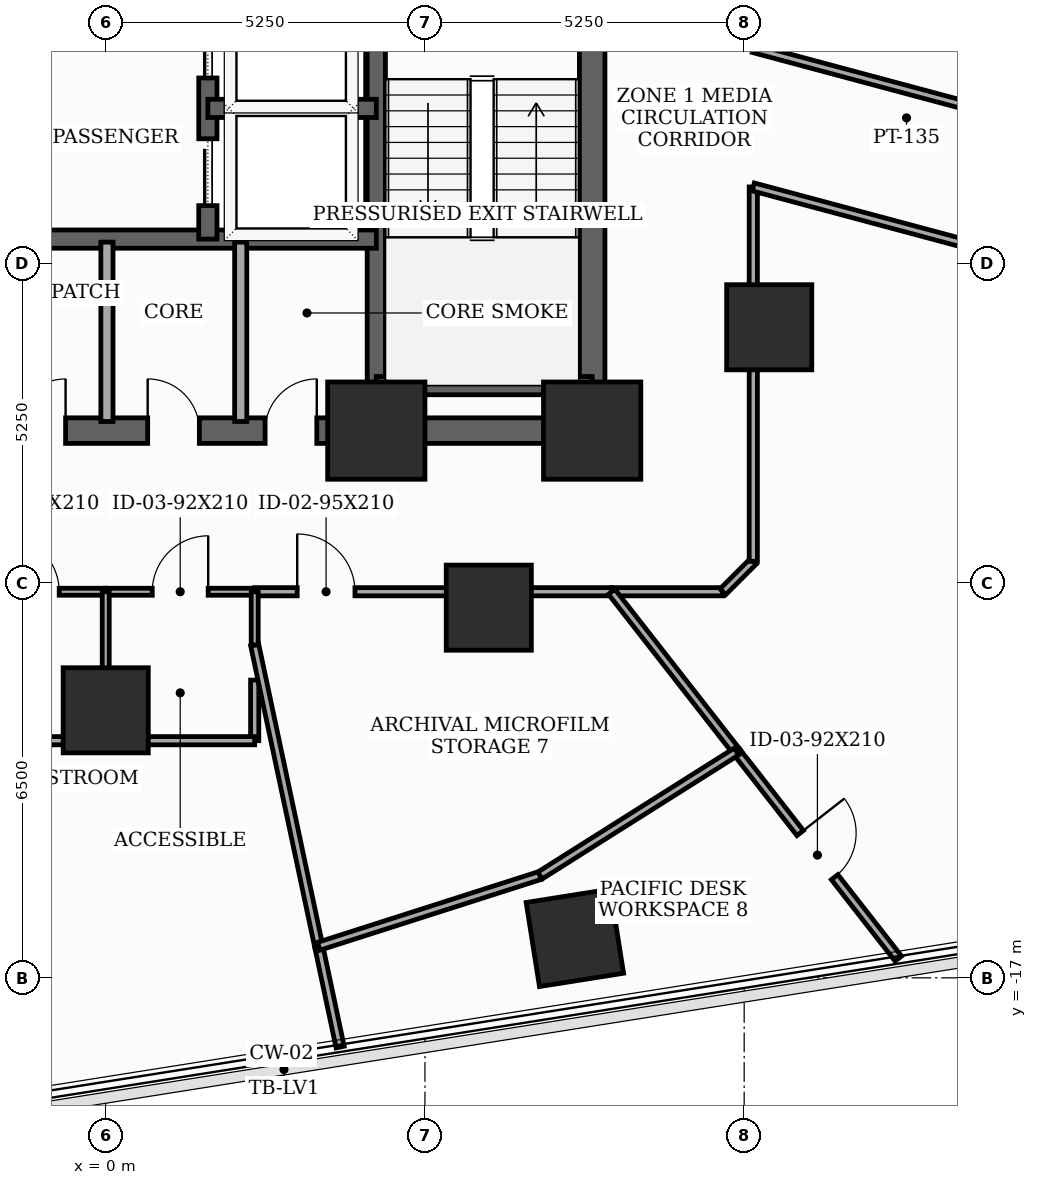
"""IFC4 building model, lengths in metres.
Left out: names, types, materials, properties, quantities, classifications, styles, units other than length and angle.
Written with IfcOpenShell. Run it as: python <this file> out.ifc"""

import sys

from ifc_helpers import new_model, si_unit, direction, frame, frame_2d, origin, origin_2d, place, context, subcontext, project, spatial, rectangle, extrude, element, fill, save


model = new_model("IFC4")
c1 = context("Model", 3, precision=1e-05, world=origin(), true_north=direction((0.0, 1.0)))
c2 = subcontext(c1, "Body", "Model", "MODEL_VIEW")
j1 = project(units=[si_unit("LENGTHUNIT", "METRE"), si_unit("PLANEANGLEUNIT", "RADIAN")], contexts=[c1])
p1 = place(None, origin())
s1 = spatial("IfcSite", under=j1, at=p1, CompositionType="ELEMENT")
p2 = place(p1, origin())
s2 = spatial("IfcBuilding", under=s1, at=p2, CompositionType="ELEMENT")
p3 = place(p2, frame((0.0, 0.0, 77.8)))
s3 = spatial("IfcBuildingStorey", under=s2, at=p3, CompositionType="ELEMENT", Elevation=77.8)
for number, where, z_axis, x_axis in (
    (1, (4.45, -8.0, 0.0), (0.0, 0.0, 1.0), (1.0, 0.0, 0.0)),
    (2, (8.0, -8.0, 0.0), (0.0, 0.0, 1.0), (1.0, 0.0, 0.0)),
):
    element("IfcColumn", number, at=place(p3, frame(where, z_axis=z_axis, x_axis=x_axis)), inside=s3, PredefinedType="COLUMN", context=c2, shape_type="SweptSolid", body=[
        extrude(rectangle(XDim=1.6, YDim=1.6, at=origin_2d()), origin(), (0.0, 0.0, 1.0), 3.7),
    ])
for number, where, z_axis, x_axis in (
    (3, (0.0, -12.6, 0.0), (0.0, 0.0, 1.0), (1.0, 0.0, 0.0)),
    (4, (6.3, -10.912, 0.0), (0.0, 0.0, 1.0), (1.0, 0.0, 0.0)),
    (5, (10.912, -6.3, 0.0), (0.0, 0.0, 1.0), (1.0, 0.0, 0.0)),
    (6, (7.716, -16.343, 0.0), (0.0, 0.0, 1.0), (0.988, 0.156, 0.0)),
):
    element("IfcColumn", number, at=place(p3, frame(where, z_axis=z_axis, x_axis=x_axis)), inside=s3, PredefinedType="COLUMN", context=c2, shape_type="SweptSolid", body=[
        extrude(rectangle(XDim=1.4, YDim=1.4, at=origin_2d()), origin(), (0.0, 0.0, 1.0), 3.7),
    ])
p4 = place(p3, frame((8.0, -8.0, 0.0), z_axis=(0.0, 0.0, 1.0), x_axis=(0.0, 1.0, 0.0)))
e7 = element("IfcWall", 7, at=p4, inside=s3, PredefinedType="SHEAR", context=c2, shape_type="SweptSolid", body=[
    extrude(rectangle(XDim=16.0, YDim=0.42, at=frame_2d((8.0, 0.0))), origin(), (0.0, 0.0, 1.0), 3.5),
])
p5 = place(p4, frame((9.6, 0.0, 0.0)))
e8 = element("IfcOpeningElement", 8, at=p5, cuts=e7, PredefinedType="OPENING", context=c2, shape_type="SweptSolid", body=[
    extrude(rectangle(XDim=1.05, YDim=2.15, at=frame_2d((0.525, 1.075))), frame((0.0, 0.22, 0.0), z_axis=(0.0, -1.0, 0.0), x_axis=(1.0, 0.0, 0.0)), (0.0, 0.0, 1.0), 0.44),
])
p6 = place(p4, frame((14.148, 0.0, 0.0)))
e9 = element("IfcOpeningElement", 9, at=p6, cuts=e7, PredefinedType="OPENING", context=c2, shape_type="SweptSolid", body=[
    extrude(rectangle(XDim=0.85, YDim=2.02, at=frame_2d((0.425, 1.01))), frame((0.0, 0.22, 0.0), z_axis=(0.0, -1.0, 0.0), x_axis=(1.0, 0.0, 0.0)), (0.0, 0.0, 1.0), 0.44),
])
p7 = place(p3, frame((-8.0, -8.0, 0.0), z_axis=(0.0, 0.0, 1.0), x_axis=(1.0, 0.0, 0.0)))
e10 = element("IfcWall", 10, at=p7, inside=s3, PredefinedType="SHEAR", context=c2, shape_type="SweptSolid", body=[
    extrude(rectangle(XDim=16.0, YDim=0.42, at=frame_2d((8.0, 0.0))), origin(), (0.0, 0.0, 1.0), 3.5),
])
p8 = place(p7, frame((4.529, 0.0, 0.0)))
e11 = element("IfcOpeningElement", 11, at=p8, cuts=e10, PredefinedType="OPENING", context=c2, shape_type="SweptSolid", body=[
    extrude(rectangle(XDim=0.85, YDim=2.02, at=frame_2d((0.425, 1.01))), frame((0.0, 0.22, 0.0), z_axis=(0.0, -1.0, 0.0), x_axis=(1.0, 0.0, 0.0)), (0.0, 0.0, 1.0), 0.44),
])
p9 = place(p7, frame((6.49, 0.0, 0.0)))
e12 = element("IfcOpeningElement", 12, at=p9, cuts=e10, PredefinedType="OPENING", context=c2, shape_type="SweptSolid", body=[
    extrude(rectangle(XDim=0.85, YDim=2.02, at=frame_2d((0.425, 1.01))), frame((0.0, 0.22, 0.0), z_axis=(0.0, -1.0, 0.0), x_axis=(1.0, 0.0, 0.0)), (0.0, 0.0, 1.0), 0.44),
])
p10 = place(p7, frame((8.69, 0.0, 0.0)))
e13 = element("IfcOpeningElement", 13, at=p10, cuts=e10, PredefinedType="OPENING", context=c2, shape_type="SweptSolid", body=[
    extrude(rectangle(XDim=0.85, YDim=2.02, at=frame_2d((0.425, 1.01))), frame((0.0, 0.22, 0.0), z_axis=(0.0, -1.0, 0.0), x_axis=(1.0, 0.0, 0.0)), (0.0, 0.0, 1.0), 0.44),
])
p11 = place(p7, frame((10.621, 0.0, 0.0)))
e14 = element("IfcOpeningElement", 14, at=p11, cuts=e10, PredefinedType="OPENING", context=c2, shape_type="SweptSolid", body=[
    extrude(rectangle(XDim=0.85, YDim=2.02, at=frame_2d((0.425, 1.01))), frame((0.0, 0.22, 0.0), z_axis=(0.0, -1.0, 0.0), x_axis=(1.0, 0.0, 0.0)), (0.0, 0.0, 1.0), 0.44),
])
p12 = place(p3, frame((4.45, -7.79, 0.0), z_axis=(0.0, 0.0, 1.0), x_axis=(0.0, 1.0, 0.0)))
e15 = element("IfcWall", 15, at=p12, inside=s3, PredefinedType="SHEAR", context=c2, shape_type="SweptSolid", body=[
    extrude(rectangle(XDim=15.58, YDim=0.3, at=frame_2d((7.79, 0.0))), origin(), (0.0, 0.0, 1.0), 3.5),
])
p13 = place(p3, frame((4.45, -7.26, 0.0), z_axis=(0.0, 0.0, 1.0), x_axis=(1.0, 0.0, 0.0)))
e16 = element("IfcWall", 16, at=p13, inside=s3, PredefinedType="SHEAR", context=c2, shape_type="SweptSolid", body=[
    extrude(rectangle(XDim=3.55, YDim=0.3, at=frame_2d((1.775, 0.0))), origin(), (0.0, 0.0, 1.0), 3.5),
])
p14 = place(p3, frame((-4.45, -4.85, 0.0), z_axis=(0.0, 0.0, 1.0), x_axis=(1.0, 0.0, 0.0)))
e17 = element("IfcWall", 17, at=p14, inside=s3, PredefinedType="SHEAR", context=c2, shape_type="SweptSolid", body=[
    extrude(rectangle(XDim=8.9, YDim=0.3, at=frame_2d((4.45, 0.0))), origin(), (0.0, 0.0, 1.0), 3.5),
])
p15 = place(p3, frame((1.68, -4.85, 0.0), z_axis=(0.0, 0.0, 1.0), x_axis=(0.0, 1.0, 0.0)))
e18 = element("IfcWall", 18, at=p15, inside=s3, PredefinedType="SHEAR", context=c2, shape_type="SweptSolid", body=[
    extrude(rectangle(XDim=12.64, YDim=0.3, at=frame_2d((6.32, 0.0))), origin(), (0.0, 0.0, 1.0), 3.5),
])
p16 = place(p15, frame((0.55, 0.0, 0.0)))
e19 = element("IfcOpeningElement", 19, at=p16, cuts=e18, PredefinedType="OPENING", context=c2, shape_type="SweptSolid", body=[
    extrude(rectangle(XDim=1.1, YDim=2.1, at=frame_2d((0.55, 1.05))), frame((0.0, 0.16, 0.0), z_axis=(0.0, -1.0, 0.0), x_axis=(1.0, 0.0, 0.0)), (0.0, 0.0, 1.0), 0.32),
])
p17 = place(p15, frame((2.65, 0.0, 0.0)))
e20 = element("IfcOpeningElement", 20, at=p17, cuts=e18, PredefinedType="OPENING", context=c2, shape_type="SweptSolid", body=[
    extrude(rectangle(XDim=1.1, YDim=2.1, at=frame_2d((0.55, 1.05))), frame((0.0, 0.16, 0.0), z_axis=(0.0, -1.0, 0.0), x_axis=(1.0, 0.0, 0.0)), (0.0, 0.0, 1.0), 0.32),
])
p18 = place(p15, frame((4.75, 0.0, 0.0)))
e21 = element("IfcOpeningElement", 21, at=p18, cuts=e18, PredefinedType="OPENING", context=c2, shape_type="SweptSolid", body=[
    extrude(rectangle(XDim=1.1, YDim=2.1, at=frame_2d((0.55, 1.05))), frame((0.0, 0.16, 0.0), z_axis=(0.0, -1.0, 0.0), x_axis=(1.0, 0.0, 0.0)), (0.0, 0.0, 1.0), 0.32),
])
p19 = place(p15, frame((6.85, 0.0, 0.0)))
e22 = element("IfcOpeningElement", 22, at=p19, cuts=e18, PredefinedType="OPENING", context=c2, shape_type="SweptSolid", body=[
    extrude(rectangle(XDim=1.1, YDim=2.1, at=frame_2d((0.55, 1.05))), frame((0.0, 0.16, 0.0), z_axis=(0.0, -1.0, 0.0), x_axis=(1.0, 0.0, 0.0)), (0.0, 0.0, 1.0), 0.32),
])
p20 = place(p15, frame((8.95, 0.0, 0.0)))
e23 = element("IfcOpeningElement", 23, at=p20, cuts=e18, PredefinedType="OPENING", context=c2, shape_type="SweptSolid", body=[
    extrude(rectangle(XDim=1.1, YDim=2.1, at=frame_2d((0.55, 1.05))), frame((0.0, 0.16, 0.0), z_axis=(0.0, -1.0, 0.0), x_axis=(1.0, 0.0, 0.0)), (0.0, 0.0, 1.0), 0.32),
])
p21 = place(p15, frame((11.05, 0.0, 0.0)))
e24 = element("IfcOpeningElement", 24, at=p21, cuts=e18, PredefinedType="OPENING", context=c2, shape_type="SweptSolid", body=[
    extrude(rectangle(XDim=1.1, YDim=2.1, at=frame_2d((0.55, 1.05))), frame((0.0, 0.16, 0.0), z_axis=(0.0, -1.0, 0.0), x_axis=(1.0, 0.0, 0.0)), (0.0, 0.0, 1.0), 0.32),
])
p22 = place(p3, frame((1.68, -2.7, 0.0), z_axis=(0.0, 0.0, 1.0), x_axis=(1.0, 0.0, 0.0)))
e25 = element("IfcWall", 25, at=p22, inside=s3, PredefinedType="SHEAR", context=c2, shape_type="SweptSolid", body=[
    extrude(rectangle(XDim=2.77, YDim=0.3, at=frame_2d((1.385, 0.0))), origin(), (0.0, 0.0, 1.0), 3.5),
])
for number, where, z_axis, x_axis in (
    (26, (0.02, -7.85, 0.0), (0.0, 0.0, 1.0), (0.0, 1.0, 0.0)),
    (27, (2.22, -7.85, 0.0), (0.0, 0.0, 1.0), (0.0, 1.0, 0.0)),
):
    element("IfcWall", number, at=place(p3, frame(where, z_axis=z_axis, x_axis=x_axis)), inside=s3, PredefinedType="SOLIDWALL", context=c2, shape_type="SweptSolid", body=[
        extrude(rectangle(XDim=2.95, YDim=0.2, at=frame_2d((1.475, 0.0))), origin(), (0.0, 0.0, 1.0), 2.885),
    ])
p23 = place(p3, frame((8.321, -10.65, 0.0), z_axis=(0.0, 0.0, 1.0), x_axis=(1.0, 0.0, 0.0)))
e28 = element("IfcWall", 28, at=p23, inside=s3, PredefinedType="PARTITIONING", context=c2, shape_type="SweptSolid", body=[
    extrude(rectangle(XDim=1.829, YDim=0.135, at=frame_2d((0.915, 0.0))), origin(), (0.0, 0.0, 1.0), 3.5),
])
p24 = place(p3, frame((10.15, -10.65, 0.0), z_axis=(0.0, 0.0, 1.0), x_axis=(0.707106781187, 0.707106781187, 0.0)))
e29 = element("IfcWall", 29, at=p24, inside=s3, PredefinedType="PARTITIONING", context=c2, shape_type="SweptSolid", body=[
    extrude(rectangle(XDim=0.707, YDim=0.135, at=frame_2d((0.354, 0.0))), origin(), (0.0, 0.0, 1.0), 3.5),
])
p25 = place(p3, frame((10.65, -10.15, 0.0), z_axis=(0.0, 0.0, 1.0), x_axis=(0.0, 1.0, 0.0)))
e30 = element("IfcWall", 30, at=p25, inside=s3, PredefinedType="PARTITIONING", context=c2, shape_type="SweptSolid", body=[
    extrude(rectangle(XDim=6.158, YDim=0.135, at=frame_2d((3.079, 0.0))), origin(), (0.0, 0.0, 1.0), 2.785),
])
p26 = place(p3, frame((10.65, -3.992, 0.0), z_axis=(0.0, 0.0, 1.0), x_axis=(0.965906888357, -0.258889712088, 0.0)))
e31 = element("IfcWall", 31, at=p26, inside=s3, PredefinedType="PARTITIONING", context=c2, shape_type="SweptSolid", body=[
    extrude(rectangle(XDim=11.28, YDim=0.135, at=frame_2d((5.64, 0.0))), origin(), (0.0, 0.0, 1.0), 2.785),
])
p27 = place(p3, frame((22.115, -4.787, 0.0), z_axis=(0.0, 0.0, 1.0), x_axis=(-0.965926659449, 0.258815935688, 0.0)))
e32 = element("IfcWall", 32, at=p27, inside=s3, PredefinedType="PARTITIONING", context=c2, shape_type="SweptSolid", body=[
    extrude(rectangle(XDim=11.87, YDim=0.135, at=frame_2d((5.935, 0.0))), origin(), (0.0, 0.0, 1.0), 2.785),
])
p28 = place(p27, frame((5.46, 0.0, 0.0)))
e33 = element("IfcOpeningElement", 33, at=p28, cuts=e32, PredefinedType="OPENING", context=c2, shape_type="SweptSolid", body=[
    extrude(rectangle(XDim=0.95, YDim=2.1, at=frame_2d((0.475, 1.05))), frame((0.0, 0.077, 0.0), z_axis=(0.0, -1.0, 0.0), x_axis=(1.0, 0.0, 0.0)), (0.0, 0.0, 1.0), 0.155),
])
p29 = place(p3, frame((-2.45, -10.65, 0.0), z_axis=(0.0, 0.0, 1.0), x_axis=(1.0, 0.0, 0.0)))
e34 = element("IfcWall", 34, at=p29, inside=s3, PredefinedType="PARTITIONING", context=c2, shape_type="SweptSolid", body=[
    extrude(rectangle(XDim=2.45, YDim=0.115, at=frame_2d((1.225, 0.0))), origin(), (0.0, 0.0, 1.0), 2.785),
])
p30 = place(p29, frame((0.765, 0.0, 0.0)))
e35 = element("IfcOpeningElement", 35, at=p30, cuts=e34, PredefinedType="OPENING", context=c2, shape_type="SweptSolid", body=[
    extrude(rectangle(XDim=0.92, YDim=2.1, at=frame_2d((0.46, 1.05))), frame((0.0, 0.067, 0.0), z_axis=(0.0, -1.0, 0.0), x_axis=(1.0, 0.0, 0.0)), (0.0, 0.0, 1.0), 0.135),
])
p31 = place(p3, frame((0.0, -10.65, 0.0), z_axis=(0.0, 0.0, 1.0), x_axis=(1.0, 0.0, 0.0)))
e36 = element("IfcWall", 36, at=p31, inside=s3, PredefinedType="PARTITIONING", context=c2, shape_type="SweptSolid", body=[
    extrude(rectangle(XDim=2.45, YDim=0.115, at=frame_2d((1.225, 0.0))), origin(), (0.0, 0.0, 1.0), 3.5),
])
p32 = place(p31, frame((0.765, 0.0, 0.0)))
e37 = element("IfcOpeningElement", 37, at=p32, cuts=e36, PredefinedType="OPENING", context=c2, shape_type="SweptSolid", body=[
    extrude(rectangle(XDim=0.92, YDim=2.1, at=frame_2d((0.46, 1.05))), frame((0.0, 0.067, 0.0), z_axis=(0.0, -1.0, 0.0), x_axis=(1.0, 0.0, 0.0)), (0.0, 0.0, 1.0), 0.135),
])
p33 = place(p3, frame((2.45, -10.65, 0.0), z_axis=(0.0, 0.0, 1.0), x_axis=(1.0, 0.0, 0.0)))
e38 = element("IfcWall", 38, at=p33, inside=s3, PredefinedType="PARTITIONING", context=c2, shape_type="SweptSolid", body=[
    extrude(rectangle(XDim=5.871, YDim=0.135, at=frame_2d((2.936, 0.0))), origin(), (0.0, 0.0, 1.0), 2.785),
])
p34 = place(p33, frame((0.699, 0.0, 0.0)))
e39 = element("IfcOpeningElement", 39, at=p34, cuts=e38, PredefinedType="OPENING", context=c2, shape_type="SweptSolid", body=[
    extrude(rectangle(XDim=0.95, YDim=2.1, at=frame_2d((0.475, 1.05))), frame((0.0, 0.077, 0.0), z_axis=(0.0, -1.0, 0.0), x_axis=(1.0, 0.0, 0.0)), (0.0, 0.0, 1.0), 0.155),
])
p35 = place(p3, frame((8.321, -10.65, 0.0), z_axis=(0.0, 0.0, 1.0), x_axis=(0.615591477706, -0.788065436735, 0.0)))
e40 = element("IfcWall", 40, at=p35, inside=s3, PredefinedType="PARTITIONING", context=c2, shape_type="SweptSolid", body=[
    extrude(rectangle(XDim=3.335, YDim=0.135, at=frame_2d((1.667, 0.0))), origin(), (0.0, 0.0, 1.0), 3.085),
])
p36 = place(p3, frame((10.374, -13.278, 0.0), z_axis=(0.0, 0.0, 1.0), x_axis=(0.615554166302, -0.78809458084, 0.0)))
e41 = element("IfcWall", 41, at=p36, inside=s3, PredefinedType="PARTITIONING", context=c2, shape_type="SweptSolid", body=[
    extrude(rectangle(XDim=4.323, YDim=0.135, at=frame_2d((2.161, 0.0))), origin(), (0.0, 0.0, 1.0), 2.935),
])
p37 = place(p36, frame((1.701, 0.0, 0.0)))
e42 = element("IfcOpeningElement", 42, at=p37, cuts=e41, PredefinedType="OPENING", context=c2, shape_type="SweptSolid", body=[
    extrude(rectangle(XDim=0.92, YDim=2.1, at=frame_2d((0.46, 1.05))), frame((0.0, 0.077, 0.0), z_axis=(0.0, -1.0, 0.0), x_axis=(1.0, 0.0, 0.0)), (0.0, 0.0, 1.0), 0.155),
])
p38 = place(p3, frame((0.0, -13.1, 0.0), z_axis=(0.0, 0.0, 1.0), x_axis=(-1.0, 0.0, 0.0)))
e43 = element("IfcWall", 43, at=p38, inside=s3, PredefinedType="PARTITIONING", context=c2, shape_type="SweptSolid", body=[
    extrude(rectangle(XDim=2.45, YDim=0.135, at=frame_2d((1.225, 0.0))), origin(), (0.0, 0.0, 1.0), 2.785),
])
p39 = place(p3, frame((2.45, -12.103, 0.0), z_axis=(0.0, 0.0, 1.0), x_axis=(0.0, -1.0, 0.0)))
e44 = element("IfcWall", 44, at=p39, inside=s3, PredefinedType="PARTITIONING", context=c2, shape_type="SweptSolid", body=[
    extrude(rectangle(XDim=0.997, YDim=0.135, at=frame_2d((0.499, 0.0))), origin(), (0.0, 0.0, 1.0), 2.785),
])
p40 = place(p3, frame((2.45, -13.1, 0.0), z_axis=(0.0, 0.0, 1.0), x_axis=(-1.0, 0.0, 0.0)))
e45 = element("IfcWall", 45, at=p40, inside=s3, PredefinedType="PARTITIONING", context=c2, shape_type="SweptSolid", body=[
    extrude(rectangle(XDim=2.45, YDim=0.135, at=frame_2d((1.225, 0.0))), origin(), (0.0, 0.0, 1.0), 2.785),
])
p41 = place(p3, frame((3.503, -16.481, 0.0), z_axis=(0.0, 0.0, 1.0), x_axis=(-0.207863367053, 0.97815787102, 0.0)))
e46 = element("IfcWall", 46, at=p41, inside=s3, PredefinedType="PARTITIONING", context=c2, shape_type="SweptSolid", body=[
    extrude(rectangle(XDim=5.066, YDim=0.135, at=frame_2d((2.533, 0.0))), origin(), (0.0, 0.0, 1.0), 2.785),
])
p42 = place(p3, frame((3.855, -18.139, 0.0), z_axis=(0.0, 0.0, 1.0), x_axis=(-0.207875985054, 0.978155189547, 0.0)))
e47 = element("IfcWall", 47, at=p42, inside=s3, PredefinedType="PARTITIONING", context=c2, shape_type="SweptSolid", body=[
    extrude(rectangle(XDim=1.695, YDim=0.135, at=frame_2d((0.847, 0.0))), origin(), (0.0, 0.0, 1.0), 2.935),
])
p43 = place(p3, frame((0.0, -13.1, 0.0), z_axis=(0.0, 0.0, 1.0), x_axis=(0.0, 1.0, 0.0)))
e48 = element("IfcWall", 48, at=p43, inside=s3, PredefinedType="PARTITIONING", context=c2, shape_type="SweptSolid", body=[
    extrude(rectangle(XDim=2.45, YDim=0.115, at=frame_2d((1.225, 0.0))), origin(), (0.0, 0.0, 1.0), 2.785),
])
p44 = place(p3, frame((2.45, -11.526, 0.0), z_axis=(0.0, 0.0, 1.0), x_axis=(0.0, 1.0, 0.0)))
e49 = element("IfcWall", 49, at=p44, inside=s3, PredefinedType="PARTITIONING", context=c2, shape_type="SweptSolid", body=[
    extrude(rectangle(XDim=0.876, YDim=0.115, at=frame_2d((0.438, 0.0))), origin(), (0.0, 0.0, 1.0), 3.5),
])
p45 = place(p3, frame((3.503, -16.481, 0.0), z_axis=(0.0, 0.0, 1.0), x_axis=(0.952459752792, 0.304664437227, 0.0)))
e50 = element("IfcWall", 50, at=p45, inside=s3, PredefinedType="PARTITIONING", context=c2, shape_type="SweptSolid", body=[
    extrude(rectangle(XDim=3.821, YDim=0.135, at=frame_2d((1.91, 0.0))), origin(), (0.0, 0.0, 1.0), 3.5),
])
p46 = place(p3, frame((7.142, -15.317, 0.0), z_axis=(0.0, 0.0, 1.0), x_axis=(0.845772681814, 0.533543410321, 0.0)))
e51 = element("IfcWall", 51, at=p46, inside=s3, PredefinedType="PARTITIONING", context=c2, shape_type="SweptSolid", body=[
    extrude(rectangle(XDim=3.821, YDim=0.135, at=frame_2d((1.911, 0.0))), origin(), (0.0, 0.0, 1.0), 2.785),
])
p47 = place(p9, origin())
e52 = element("IfcDoor", 52, at=p47, inside=s3, OperationType="SINGLE_SWING_RIGHT", PredefinedType="TRAPDOOR", context=c2, shape_type="SweptSolid", body=[
    extrude(rectangle(XDim=0.85, YDim=2.02, at=frame_2d((0.425, 1.01))), frame((0.0, 0.025, 0.0), z_axis=(0.0, -1.0, 0.0), x_axis=(1.0, 0.0, 0.0)), (0.0, 0.0, 1.0), 0.05),
])
fill(e12, e52)
p48 = place(p10, origin())
e53 = element("IfcDoor", 53, at=p48, inside=s3, OperationType="SINGLE_SWING_LEFT", PredefinedType="TRAPDOOR", context=c2, shape_type="SweptSolid", body=[
    extrude(rectangle(XDim=0.85, YDim=2.02, at=frame_2d((0.425, 1.01))), frame((0.0, 0.025, 0.0), z_axis=(0.0, -1.0, 0.0), x_axis=(1.0, 0.0, 0.0)), (0.0, 0.0, 1.0), 0.05),
])
fill(e13, e53)
p49 = place(p11, origin())
e54 = element("IfcDoor", 54, at=p49, inside=s3, OperationType="SINGLE_SWING_RIGHT", PredefinedType="TRAPDOOR", context=c2, shape_type="SweptSolid", body=[
    extrude(rectangle(XDim=0.85, YDim=2.02, at=frame_2d((0.425, 1.01))), frame((0.0, 0.025, 0.0), z_axis=(0.0, -1.0, 0.0), x_axis=(1.0, 0.0, 0.0)), (0.0, 0.0, 1.0), 0.05),
])
fill(e14, e54)
p50 = place(p16, origin())
e55 = element("IfcDoor", 55, at=p50, inside=s3, OperationType="SLIDING_TO_LEFT", PredefinedType="DOOR", context=c2, shape_type="SweptSolid", body=[
    extrude(rectangle(XDim=1.1, YDim=2.1, at=frame_2d((0.55, 1.05))), frame((0.0, 0.025, 0.0), z_axis=(0.0, -1.0, 0.0), x_axis=(1.0, 0.0, 0.0)), (0.0, 0.0, 1.0), 0.05),
])
fill(e19, e55)
p51 = place(p17, origin())
e56 = element("IfcDoor", 56, at=p51, inside=s3, OperationType="SLIDING_TO_LEFT", PredefinedType="DOOR", context=c2, shape_type="SweptSolid", body=[
    extrude(rectangle(XDim=1.1, YDim=2.1, at=frame_2d((0.55, 1.05))), frame((0.0, 0.025, 0.0), z_axis=(0.0, -1.0, 0.0), x_axis=(1.0, 0.0, 0.0)), (0.0, 0.0, 1.0), 0.05),
])
fill(e20, e56)
p52 = place(p30, origin())
e57 = element("IfcDoor", 57, at=p52, inside=s3, OperationType="SINGLE_SWING_LEFT", PredefinedType="DOOR", context=c2, shape_type="SweptSolid", body=[
    extrude(rectangle(XDim=0.92, YDim=2.1, at=frame_2d((0.46, 1.05))), frame((0.0, 0.025, 0.0), z_axis=(0.0, -1.0, 0.0), x_axis=(1.0, 0.0, 0.0)), (0.0, 0.0, 1.0), 0.05),
])
fill(e35, e57)
p53 = place(p32, origin())
e58 = element("IfcDoor", 58, at=p53, inside=s3, OperationType="SINGLE_SWING_RIGHT", PredefinedType="DOOR", context=c2, shape_type="SweptSolid", body=[
    extrude(rectangle(XDim=0.92, YDim=2.1, at=frame_2d((0.46, 1.05))), frame((0.0, 0.025, 0.0), z_axis=(0.0, -1.0, 0.0), x_axis=(1.0, 0.0, 0.0)), (0.0, 0.0, 1.0), 0.05),
])
fill(e37, e58)
p54 = place(p34, origin())
e59 = element("IfcDoor", 59, at=p54, inside=s3, OperationType="SINGLE_SWING_LEFT", PredefinedType="DOOR", context=c2, shape_type="SweptSolid", body=[
    extrude(rectangle(XDim=0.95, YDim=2.1, at=frame_2d((0.475, 1.05))), frame((0.0, 0.025, 0.0), z_axis=(0.0, -1.0, 0.0), x_axis=(1.0, 0.0, 0.0)), (0.0, 0.0, 1.0), 0.05),
])
fill(e39, e59)
p55 = place(p37, origin())
e60 = element("IfcDoor", 60, at=p55, inside=s3, OperationType="SINGLE_SWING_LEFT", PredefinedType="DOOR", context=c2, shape_type="SweptSolid", body=[
    extrude(rectangle(XDim=0.92, YDim=2.1, at=frame_2d((0.46, 1.05))), frame((0.0, 0.025, 0.0), z_axis=(0.0, -1.0, 0.0), x_axis=(1.0, 0.0, 0.0)), (0.0, 0.0, 1.0), 0.05),
])
fill(e42, e60)
save(model, sys.argv[1])
